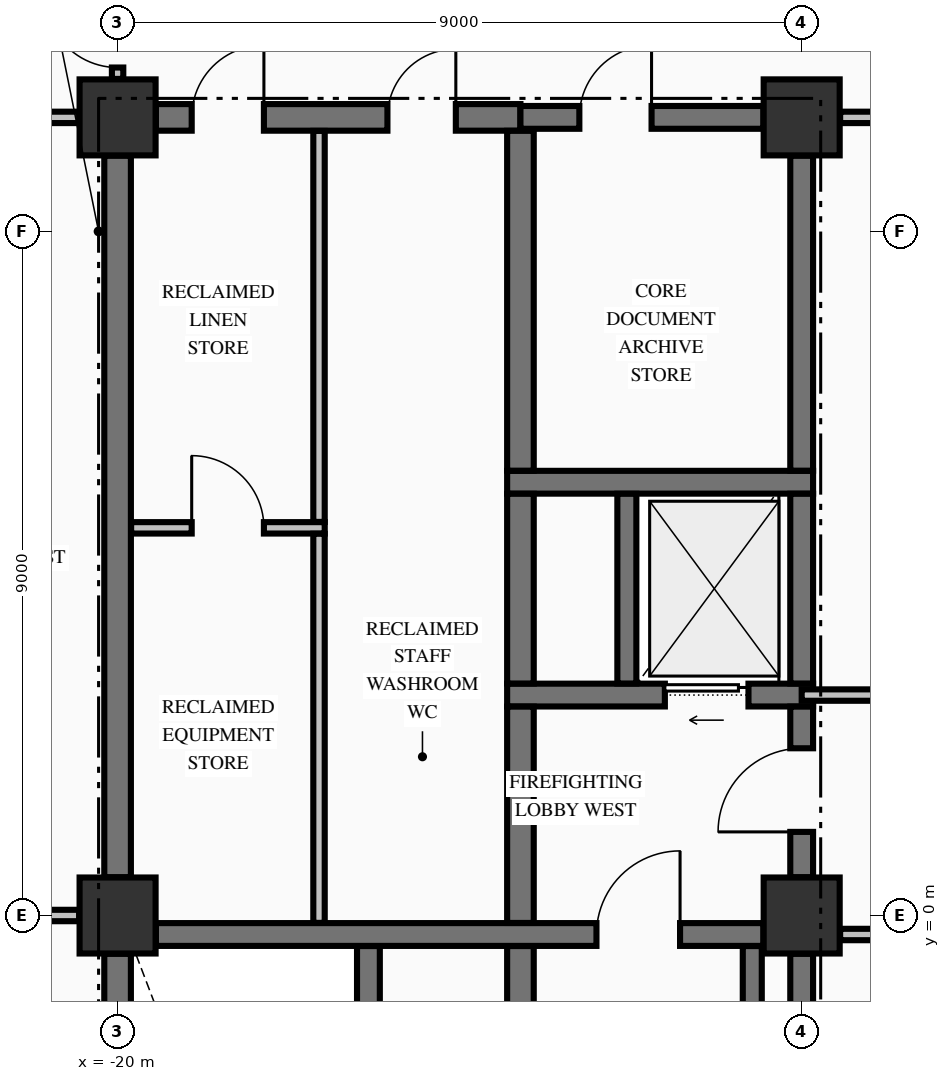
"""IFC4 building model, lengths in metres.
Left out: names, types, materials, properties, quantities, classifications, styles, units other than length and angle.
Written with IfcOpenShell. Run it as: python <this file> out.ifc"""

import sys

from ifc_helpers import new_model, si_unit, direction, frame, frame_2d, origin, origin_2d, place, context, subcontext, project, spatial, rectangle, extrude, element, fill, save


model = new_model("IFC4")
c1 = context("Model", 3, precision=1e-05, world=origin(), true_north=direction((0.0, 1.0)))
c2 = subcontext(c1, "Body", "Model", "MODEL_VIEW")
j1 = project(units=[si_unit("LENGTHUNIT", "METRE"), si_unit("PLANEANGLEUNIT", "RADIAN")], contexts=[c1])
p1 = place(None, origin())
s1 = spatial("IfcSite", under=j1, at=p1, CompositionType="ELEMENT")
p2 = place(p1, origin())
s2 = spatial("IfcBuilding", under=s1, at=p2, CompositionType="ELEMENT")
p3 = place(p2, frame((0.0, 0.0, 98.5)))
s3 = spatial("IfcBuildingStorey", under=s2, at=p3, CompositionType="ELEMENT", Elevation=98.5)
for number, where, z_axis, x_axis in (
    (1, (-20.0, 10.5, -0.275), (0.0, 0.0, 1.0), (1.0, 0.0, 0.0)),
    (2, (-11.0, 0.0, -0.275), (0.0, 0.0, 1.0), (1.0, 0.0, 0.0)),
    (3, (-11.0, 10.5, -0.275), (0.0, 0.0, 1.0), (1.0, 0.0, 0.0)),
    (4, (-20.0, 0.0, -0.275), (0.0, 0.0, 1.0), (1.0, 0.0, 0.0)),
):
    element("IfcColumn", number, at=place(p3, frame(where, z_axis=z_axis, x_axis=x_axis)), inside=s3, PredefinedType="COLUMN", context=c2, shape_type="SweptSolid", body=[
        extrude(rectangle(XDim=1.0, YDim=1.0, at=origin_2d()), origin(), (0.0, 0.0, 1.0), 3.595),
    ])
p4 = place(p3, frame((-19.496, -0.25, 0.0), z_axis=(0.0, 0.0, 1.0), x_axis=(1.0, 0.0, 0.0)))
e5 = element("IfcWall", 5, at=p4, inside=s3, PredefinedType="SHEAR", context=c2, shape_type="SweptSolid", body=[
    extrude(rectangle(XDim=7.992, YDim=0.3, at=frame_2d((3.996, 0.0))), origin(), (0.0, 0.0, 1.0), 3.32),
])
p5 = place(p4, frame((5.796, 0.0, 0.0)))
e6 = element("IfcOpeningElement", 6, at=p5, cuts=e5, PredefinedType="OPENING", context=c2, shape_type="SweptSolid", body=[
    extrude(rectangle(XDim=1.1, YDim=2.15, at=frame_2d((0.55, 1.075))), frame((0.0, 0.16, 0.0), z_axis=(0.0, -1.0, 0.0), x_axis=(1.0, 0.0, 0.0)), (0.0, 0.0, 1.0), 0.32),
])
p6 = place(p3, frame((-14.875, 2.9, 0.0), z_axis=(0.0, 0.0, 1.0), x_axis=(1.0, 0.0, 0.0)))
e7 = element("IfcWall", 7, at=p6, inside=s3, PredefinedType="SHEAR", context=c2, shape_type="SweptSolid", body=[
    extrude(rectangle(XDim=4.025, YDim=0.3, at=frame_2d((2.012, 0.0))), origin(), (0.0, 0.0, 1.0), 3.32),
])
p7 = place(p6, frame((2.075, 0.0, 0.0)))
e8 = element("IfcOpeningElement", 8, at=p7, cuts=e7, PredefinedType="OPENING", context=c2, shape_type="SweptSolid", body=[
    extrude(rectangle(XDim=1.1, YDim=2.2, at=frame_2d((0.55, 1.1))), frame((0.0, 0.16, 0.0), z_axis=(0.0, -1.0, 0.0), x_axis=(1.0, 0.0, 0.0)), (0.0, 0.0, 1.0), 0.32),
])
p8 = place(p3, frame((-14.875, 5.7, 0.0), z_axis=(0.0, 0.0, 1.0), x_axis=(1.0, 0.0, 0.0)))
e9 = element("IfcWall", 9, at=p8, inside=s3, PredefinedType="SHEAR", context=c2, shape_type="SweptSolid", body=[
    extrude(rectangle(XDim=4.025, YDim=0.3, at=frame_2d((2.012, 0.0))), origin(), (0.0, 0.0, 1.0), 3.32),
])
p9 = place(p3, frame((-19.496, 10.5, 0.0), z_axis=(0.0, 0.0, 1.0), x_axis=(1.0, 0.0, 0.0)))
e10 = element("IfcWall", 10, at=p9, inside=s3, PredefinedType="SHEAR", context=c2, shape_type="SweptSolid", body=[
    extrude(rectangle(XDim=4.796, YDim=0.35, at=frame_2d((2.398, 0.0))), origin(), (0.0, 0.0, 1.0), 3.32),
])
p10 = place(p9, frame((0.471, 0.0, 0.0)))
e11 = element("IfcOpeningElement", 11, at=p10, cuts=e10, PredefinedType="OPENING", context=c2, shape_type="SweptSolid", body=[
    extrude(rectangle(XDim=0.95, YDim=2.15, at=frame_2d((0.475, 1.075))), frame((0.0, 0.185, 0.0), z_axis=(0.0, -1.0, 0.0), x_axis=(1.0, 0.0, 0.0)), (0.0, 0.0, 1.0), 0.37),
])
p11 = place(p9, frame((3.046, 0.0, 0.0)))
e12 = element("IfcOpeningElement", 12, at=p11, cuts=e10, PredefinedType="OPENING", context=c2, shape_type="SweptSolid", body=[
    extrude(rectangle(XDim=0.9, YDim=2.15, at=frame_2d((0.45, 1.075))), frame((0.0, 0.185, 0.0), z_axis=(0.0, -1.0, 0.0), x_axis=(1.0, 0.0, 0.0)), (0.0, 0.0, 1.0), 0.37),
])
p12 = place(p3, frame((-14.7, 10.5, 0.0), z_axis=(0.0, 0.0, 1.0), x_axis=(1.0, 0.0, 0.0)))
e13 = element("IfcWall", 13, at=p12, inside=s3, PredefinedType="SHEAR", context=c2, shape_type="SweptSolid", body=[
    extrude(rectangle(XDim=3.196, YDim=0.3, at=frame_2d((1.598, 0.0))), origin(), (0.0, 0.0, 1.0), 3.32),
])
p13 = place(p12, frame((0.775, 0.0, 0.0)))
e14 = element("IfcOpeningElement", 14, at=p13, cuts=e13, PredefinedType="OPENING", context=c2, shape_type="SweptSolid", body=[
    extrude(rectangle(XDim=0.95, YDim=2.15, at=frame_2d((0.475, 1.075))), frame((0.0, 0.16, 0.0), z_axis=(0.0, -1.0, 0.0), x_axis=(1.0, 0.0, 0.0)), (0.0, 0.0, 1.0), 0.32),
])
p14 = place(p3, frame((-10.494, -0.25, 0.0), z_axis=(0.0, 0.0, 1.0), x_axis=(1.0, 0.0, 0.0)))
e15 = element("IfcWall", 15, at=p14, inside=s3, PredefinedType="PARTITIONING", context=c2, shape_type="SweptSolid", body=[
    extrude(rectangle(XDim=20.988, YDim=0.15, at=frame_2d((10.494, 0.0))), origin(), (0.0, 0.0, 1.0), 3.32),
])
p15 = place(p14, frame((8.194, 0.0, 0.0)))
e16 = element("IfcOpeningElement", 16, at=p15, cuts=e15, PredefinedType="OPENING", context=c2, shape_type="SweptSolid", body=[
    extrude(rectangle(XDim=1.1, YDim=2.15, at=frame_2d((0.55, 1.075))), frame((0.0, 0.085, 0.0), z_axis=(0.0, -1.0, 0.0), x_axis=(1.0, 0.0, 0.0)), (0.0, 0.0, 1.0), 0.17),
])
p16 = place(p14, frame((3.049, 0.0, 0.0)))
e17 = element("IfcOpeningElement", 17, at=p16, cuts=e15, PredefinedType="OPENING", context=c2, shape_type="SweptSolid", body=[
    extrude(rectangle(XDim=1.05, YDim=2.15, at=frame_2d((0.525, 1.075))), frame((0.0, 0.085, 0.0), z_axis=(0.0, -1.0, 0.0), x_axis=(1.0, 0.0, 0.0)), (0.0, 0.0, 1.0), 0.17),
])
p17 = place(p14, frame((15.189, 0.0, 0.0)))
e18 = element("IfcOpeningElement", 18, at=p17, cuts=e15, PredefinedType="OPENING", context=c2, shape_type="SweptSolid", body=[
    extrude(rectangle(XDim=0.95, YDim=2.15, at=frame_2d((0.475, 1.075))), frame((0.0, 0.085, 0.0), z_axis=(0.0, -1.0, 0.0), x_axis=(1.0, 0.0, 0.0)), (0.0, 0.0, 1.0), 0.17),
])
p18 = place(p3, frame((-22.394, 0.0, 0.0), z_axis=(0.0, 0.0, 1.0), x_axis=(1.0, 0.0, 0.0)))
e19 = element("IfcWall", 19, at=p18, inside=s3, PredefinedType="PARTITIONING", context=c2, shape_type="SweptSolid", body=[
    extrude(rectangle(XDim=1.888, YDim=0.15, at=frame_2d((0.944, 0.0))), origin(), (0.0, 0.0, 1.0), 2.81),
])
p19 = place(p3, frame((-11.0, 2.9, 0.0), z_axis=(0.0, 0.0, 1.0), x_axis=(1.0, 0.0, 0.0)))
e20 = element("IfcWall", 20, at=p19, inside=s3, PredefinedType="PARTITIONING", context=c2, shape_type="SweptSolid", body=[
    extrude(rectangle(XDim=22.0, YDim=0.15, at=frame_2d((11.0, 0.0))), origin(), (0.0, 0.0, 1.0), 3.32),
])
p20 = place(p19, frame((8.7, 0.0, 0.0)))
e21 = element("IfcOpeningElement", 21, at=p20, cuts=e20, PredefinedType="OPENING", context=c2, shape_type="SweptSolid", body=[
    extrude(rectangle(XDim=1.1, YDim=2.15, at=frame_2d((0.55, 1.075))), frame((0.0, 0.085, 0.0), z_axis=(0.0, -1.0, 0.0), x_axis=(1.0, 0.0, 0.0)), (0.0, 0.0, 1.0), 0.17),
])
p21 = place(p19, frame((3.555, 0.0, 0.0)))
e22 = element("IfcOpeningElement", 22, at=p21, cuts=e20, PredefinedType="OPENING", context=c2, shape_type="SweptSolid", body=[
    extrude(rectangle(XDim=1.05, YDim=2.15, at=frame_2d((0.525, 1.075))), frame((0.0, 0.085, 0.0), z_axis=(0.0, -1.0, 0.0), x_axis=(1.0, 0.0, 0.0)), (0.0, 0.0, 1.0), 0.17),
])
p22 = place(p19, frame((15.62, 0.0, 0.0)))
e23 = element("IfcOpeningElement", 23, at=p22, cuts=e20, PredefinedType="OPENING", context=c2, shape_type="SweptSolid", body=[
    extrude(rectangle(XDim=1.1, YDim=2.15, at=frame_2d((0.55, 1.075))), frame((0.0, 0.085, 0.0), z_axis=(0.0, -1.0, 0.0), x_axis=(1.0, 0.0, 0.0)), (0.0, 0.0, 1.0), 0.17),
])
p23 = place(p3, frame((-19.822, 5.1, 0.0), z_axis=(0.0, 0.0, 1.0), x_axis=(1.0, 0.0, 0.0)))
e24 = element("IfcWall", 24, at=p23, inside=s3, PredefinedType="PARTITIONING", context=c2, shape_type="SweptSolid", body=[
    extrude(rectangle(XDim=2.547, YDim=0.15, at=frame_2d((1.273, 0.0))), origin(), (0.0, 0.0, 1.0), 3.32),
])
p24 = place(p23, frame((0.797, 0.0, 0.0)))
e25 = element("IfcOpeningElement", 25, at=p24, cuts=e24, PredefinedType="OPENING", context=c2, shape_type="SweptSolid", body=[
    extrude(rectangle(XDim=0.95, YDim=2.15, at=frame_2d((0.475, 1.075))), frame((0.0, 0.085, 0.0), z_axis=(0.0, -1.0, 0.0), x_axis=(1.0, 0.0, 0.0)), (0.0, 0.0, 1.0), 0.17),
])
p25 = place(p3, frame((-22.835, 10.5, 0.0), z_axis=(0.0, 0.0, 1.0), x_axis=(1.0, 0.0, 0.0)))
e26 = element("IfcWall", 26, at=p25, inside=s3, PredefinedType="PARTITIONING", context=c2, shape_type="SweptSolid", body=[
    extrude(rectangle(XDim=2.329, YDim=0.15, at=frame_2d((1.165, 0.0))), origin(), (0.0, 0.0, 1.0), 3.32),
])
p26 = place(p25, frame((0.86, 0.0, 0.0)))
e27 = element("IfcOpeningElement", 27, at=p26, cuts=e26, PredefinedType="OPENING", context=c2, shape_type="SweptSolid", body=[
    extrude(rectangle(XDim=0.95, YDim=2.15, at=frame_2d((0.475, 1.075))), frame((0.0, 0.085, 0.0), z_axis=(0.0, -1.0, 0.0), x_axis=(1.0, 0.0, 0.0)), (0.0, 0.0, 1.0), 0.17),
])
p27 = place(p3, frame((-10.494, 10.5, 0.0), z_axis=(0.0, 0.0, 1.0), x_axis=(1.0, 0.0, 0.0)))
e28 = element("IfcWall", 28, at=p27, inside=s3, PredefinedType="PARTITIONING", context=c2, shape_type="SweptSolid", body=[
    extrude(rectangle(XDim=20.988, YDim=0.15, at=frame_2d((10.494, 0.0))), origin(), (0.0, 0.0, 1.0), 3.32),
])
p28 = place(p27, frame((8.194, 0.0, 0.0)))
e29 = element("IfcOpeningElement", 29, at=p28, cuts=e28, PredefinedType="OPENING", context=c2, shape_type="SweptSolid", body=[
    extrude(rectangle(XDim=1.1, YDim=2.15, at=frame_2d((0.55, 1.075))), frame((0.0, 0.085, 0.0), z_axis=(0.0, -1.0, 0.0), x_axis=(1.0, 0.0, 0.0)), (0.0, 0.0, 1.0), 0.17),
])
p29 = place(p3, frame((-20.0, -9.446, 0.0), z_axis=(0.0, 0.0, 1.0), x_axis=(0.0, 1.0, 0.0)))
e30 = element("IfcWall", 30, at=p29, inside=s3, PredefinedType="SHEAR", context=c2, shape_type="SweptSolid", body=[
    extrude(rectangle(XDim=8.942, YDim=0.35, at=frame_2d((4.471, 0.0))), origin(), (0.0, 0.0, 1.0), 3.32),
])
p30 = place(p3, frame((-20.0, 0.504, 0.0), z_axis=(0.0, 0.0, 1.0), x_axis=(0.0, 1.0, 0.0)))
e31 = element("IfcWall", 31, at=p30, inside=s3, PredefinedType="SHEAR", context=c2, shape_type="SweptSolid", body=[
    extrude(rectangle(XDim=9.492, YDim=0.35, at=frame_2d((4.746, 0.0))), origin(), (0.0, 0.0, 1.0), 3.32),
])
p31 = place(p3, frame((-16.7, -9.773, 0.0), z_axis=(0.0, 0.0, 1.0), x_axis=(0.0, 1.0, 0.0)))
e32 = element("IfcWall", 32, at=p31, inside=s3, PredefinedType="SHEAR", context=c2, shape_type="SweptSolid", body=[
    extrude(rectangle(XDim=9.371, YDim=0.3, at=frame_2d((4.686, 0.0))), origin(), (0.0, 0.0, 1.0), 3.32),
])
p32 = place(p3, frame((-14.7, -9.773, 0.0), z_axis=(0.0, 0.0, 1.0), x_axis=(0.0, 1.0, 0.0)))
e33 = element("IfcWall", 33, at=p32, inside=s3, PredefinedType="SHEAR", context=c2, shape_type="SweptSolid", body=[
    extrude(rectangle(XDim=9.371, YDim=0.35, at=frame_2d((4.686, 0.0))), origin(), (0.0, 0.0, 1.0), 3.32),
])
p33 = place(p3, frame((-14.7, -0.098, 0.0), z_axis=(0.0, 0.0, 1.0), x_axis=(0.0, 1.0, 0.0)))
e34 = element("IfcWall", 34, at=p33, inside=s3, PredefinedType="SHEAR", context=c2, shape_type="SweptSolid", body=[
    extrude(rectangle(XDim=2.846, YDim=0.35, at=frame_2d((1.423, 0.0))), origin(), (0.0, 0.0, 1.0), 3.32),
])
p34 = place(p3, frame((-14.7, 3.052, 0.0), z_axis=(0.0, 0.0, 1.0), x_axis=(0.0, 1.0, 0.0)))
e35 = element("IfcWall", 35, at=p34, inside=s3, PredefinedType="SHEAR", context=c2, shape_type="SweptSolid", body=[
    extrude(rectangle(XDim=2.496, YDim=0.35, at=frame_2d((1.248, 0.0))), origin(), (0.0, 0.0, 1.0), 3.32),
])
p35 = place(p3, frame((-14.7, 5.852, 0.0), z_axis=(0.0, 0.0, 1.0), x_axis=(0.0, 1.0, 0.0)))
e36 = element("IfcWall", 36, at=p35, inside=s3, PredefinedType="SHEAR", context=c2, shape_type="SweptSolid", body=[
    extrude(rectangle(XDim=4.471, YDim=0.35, at=frame_2d((2.235, 0.0))), origin(), (0.0, 0.0, 1.0), 3.32),
])
p36 = place(p3, frame((-13.3, 3.052, 0.0), z_axis=(0.0, 0.0, 1.0), x_axis=(0.0, 1.0, 0.0)))
e37 = element("IfcWall", 37, at=p36, inside=s3, PredefinedType="SOLIDWALL", context=c2, shape_type="SweptSolid", body=[
    extrude(rectangle(XDim=2.496, YDim=0.25, at=frame_2d((1.248, 0.0))), origin(), (0.0, 0.0, 1.0), 3.32),
])
p37 = place(p3, frame((-11.65, -9.798, 0.0), z_axis=(0.0, 0.0, 1.0), x_axis=(0.0, 1.0, 0.0)))
e38 = element("IfcWall", 38, at=p37, inside=s3, PredefinedType="SOLIDWALL", context=c2, shape_type="SweptSolid", body=[
    extrude(rectangle(XDim=9.396, YDim=0.25, at=frame_2d((4.698, 0.0))), origin(), (0.0, 0.0, 1.0), 3.32),
])
p38 = place(p3, frame((-11.0, -9.446, 0.0), z_axis=(0.0, 0.0, 1.0), x_axis=(0.0, 1.0, 0.0)))
e39 = element("IfcWall", 39, at=p38, inside=s3, PredefinedType="SHEAR", context=c2, shape_type="SweptSolid", body=[
    extrude(rectangle(XDim=8.942, YDim=0.3, at=frame_2d((4.471, 0.0))), origin(), (0.0, 0.0, 1.0), 3.32),
])
p39 = place(p3, frame((-11.0, 0.504, 0.0), z_axis=(0.0, 0.0, 1.0), x_axis=(0.0, 1.0, 0.0)))
e40 = element("IfcWall", 40, at=p39, inside=s3, PredefinedType="SHEAR", context=c2, shape_type="SweptSolid", body=[
    extrude(rectangle(XDim=2.244, YDim=0.3, at=frame_2d((1.122, 0.0))), origin(), (0.0, 0.0, 1.0), 3.32),
])
p40 = place(p39, frame((0.596, 0.0, 0.0)))
e41 = element("IfcOpeningElement", 41, at=p40, cuts=e40, PredefinedType="OPENING", context=c2, shape_type="SweptSolid", body=[
    extrude(rectangle(XDim=1.1, YDim=2.15, at=frame_2d((0.55, 1.075))), frame((0.0, 0.16, 0.0), z_axis=(0.0, -1.0, 0.0), x_axis=(1.0, 0.0, 0.0)), (0.0, 0.0, 1.0), 0.32),
])
p41 = place(p3, frame((-11.0, 3.052, 0.0), z_axis=(0.0, 0.0, 1.0), x_axis=(0.0, 1.0, 0.0)))
e42 = element("IfcWall", 42, at=p41, inside=s3, PredefinedType="SHEAR", context=c2, shape_type="SweptSolid", body=[
    extrude(rectangle(XDim=2.496, YDim=0.3, at=frame_2d((1.248, 0.0))), origin(), (0.0, 0.0, 1.0), 3.32),
])
p42 = place(p3, frame((-11.0, 5.852, 0.0), z_axis=(0.0, 0.0, 1.0), x_axis=(0.0, 1.0, 0.0)))
e43 = element("IfcWall", 43, at=p42, inside=s3, PredefinedType="SHEAR", context=c2, shape_type="SweptSolid", body=[
    extrude(rectangle(XDim=4.144, YDim=0.3, at=frame_2d((2.072, 0.0))), origin(), (0.0, 0.0, 1.0), 3.32),
])
p43 = place(p3, frame((-20.0, 11.006, 0.0), z_axis=(0.0, 0.0, 1.0), x_axis=(0.0, 1.0, 0.0)))
e44 = element("IfcWall", 44, at=p43, inside=s3, PredefinedType="PARTITIONING", context=c2, shape_type="SweptSolid", body=[
    extrude(rectangle(XDim=1.666, YDim=0.15, at=frame_2d((0.833, 0.0))), origin(), (0.0, 0.0, 1.0), 2.81),
])
p44 = place(p43, frame((0.15, 0.0, 0.0)))
e45 = element("IfcOpeningElement", 45, at=p44, cuts=e44, PredefinedType="OPENING", context=c2, shape_type="SweptSolid", body=[
    extrude(rectangle(XDim=0.95, YDim=2.15, at=frame_2d((0.475, 1.075))), frame((0.0, 0.085, 0.0), z_axis=(0.0, -1.0, 0.0), x_axis=(1.0, 0.0, 0.0)), (0.0, 0.0, 1.0), 0.17),
])
p45 = place(p3, frame((-17.35, -0.097, 0.0), z_axis=(0.0, 0.0, 1.0), x_axis=(0.0, 1.0, 0.0)))
e46 = element("IfcWall", 46, at=p45, inside=s3, PredefinedType="PARTITIONING", context=c2, shape_type="SweptSolid", body=[
    extrude(rectangle(XDim=5.119, YDim=0.15, at=frame_2d((2.56, 0.0))), origin(), (0.0, 0.0, 1.0), 3.32),
])
p46 = place(p3, frame((-17.35, 5.178, 0.0), z_axis=(0.0, 0.0, 1.0), x_axis=(0.0, 1.0, 0.0)))
e47 = element("IfcWall", 47, at=p46, inside=s3, PredefinedType="PARTITIONING", context=c2, shape_type="SweptSolid", body=[
    extrude(rectangle(XDim=5.144, YDim=0.15, at=frame_2d((2.572, 0.0))), origin(), (0.0, 0.0, 1.0), 3.32),
])
p47 = place(p5, origin())
e48 = element("IfcDoor", 48, at=p47, inside=s3, OperationType="SINGLE_SWING_RIGHT", PredefinedType="DOOR", context=c2, shape_type="SweptSolid", body=[
    extrude(rectangle(XDim=1.1, YDim=2.15, at=frame_2d((0.55, 1.075))), frame((0.0, 0.025, 0.0), z_axis=(0.0, -1.0, 0.0), x_axis=(1.0, 0.0, 0.0)), (0.0, 0.0, 1.0), 0.05),
])
fill(e6, e48)
p48 = place(p40, origin())
e49 = element("IfcDoor", 49, at=p48, inside=s3, OperationType="SINGLE_SWING_LEFT", PredefinedType="DOOR", context=c2, shape_type="SweptSolid", body=[
    extrude(rectangle(XDim=1.1, YDim=2.15, at=frame_2d((0.55, 1.075))), frame((0.0, 0.025, 0.0), z_axis=(0.0, -1.0, 0.0), x_axis=(1.0, 0.0, 0.0)), (0.0, 0.0, 1.0), 0.05),
])
fill(e41, e49)
p49 = place(p7, origin())
e50 = element("IfcDoor", 50, at=p49, inside=s3, OperationType="SLIDING_TO_LEFT", PredefinedType="DOOR", context=c2, shape_type="SweptSolid", body=[
    extrude(rectangle(XDim=1.1, YDim=2.2, at=frame_2d((0.55, 1.1))), frame((0.0, 0.025, 0.0), z_axis=(0.0, -1.0, 0.0), x_axis=(1.0, 0.0, 0.0)), (0.0, 0.0, 1.0), 0.05),
])
fill(e8, e50)
p50 = place(p13, origin())
e51 = element("IfcDoor", 51, at=p50, inside=s3, OperationType="SINGLE_SWING_RIGHT", PredefinedType="DOOR", context=c2, shape_type="SweptSolid", body=[
    extrude(rectangle(XDim=0.95, YDim=2.15, at=frame_2d((0.475, 1.075))), frame((0.0, 0.025, 0.0), z_axis=(0.0, -1.0, 0.0), x_axis=(1.0, 0.0, 0.0)), (0.0, 0.0, 1.0), 0.05),
])
fill(e14, e51)
p51 = place(p10, origin())
e52 = element("IfcDoor", 52, at=p51, inside=s3, OperationType="SINGLE_SWING_RIGHT", PredefinedType="DOOR", context=c2, shape_type="SweptSolid", body=[
    extrude(rectangle(XDim=0.95, YDim=2.15, at=frame_2d((0.475, 1.075))), frame((0.0, 0.025, 0.0), z_axis=(0.0, -1.0, 0.0), x_axis=(1.0, 0.0, 0.0)), (0.0, 0.0, 1.0), 0.05),
])
fill(e11, e52)
p52 = place(p24, origin())
e53 = element("IfcDoor", 53, at=p52, inside=s3, OperationType="SINGLE_SWING_LEFT", PredefinedType="DOOR", context=c2, shape_type="SweptSolid", body=[
    extrude(rectangle(XDim=0.95, YDim=2.15, at=frame_2d((0.475, 1.075))), frame((0.0, 0.025, 0.0), z_axis=(0.0, -1.0, 0.0), x_axis=(1.0, 0.0, 0.0)), (0.0, 0.0, 1.0), 0.05),
])
fill(e25, e53)
p53 = place(p11, origin())
e54 = element("IfcDoor", 54, at=p53, inside=s3, OperationType="SINGLE_SWING_RIGHT", PredefinedType="DOOR", context=c2, shape_type="SweptSolid", body=[
    extrude(rectangle(XDim=0.9, YDim=2.15, at=frame_2d((0.45, 1.075))), frame((0.0, 0.025, 0.0), z_axis=(0.0, -1.0, 0.0), x_axis=(1.0, 0.0, 0.0)), (0.0, 0.0, 1.0), 0.05),
])
fill(e12, e54)
p54 = place(p44, origin())
e55 = element("IfcDoor", 55, at=p54, inside=s3, OperationType="SINGLE_SWING_RIGHT", PredefinedType="DOOR", context=c2, shape_type="SweptSolid", body=[
    extrude(rectangle(XDim=0.95, YDim=2.15, at=frame_2d((0.475, 1.075))), frame((0.0, 0.025, 0.0), z_axis=(0.0, -1.0, 0.0), x_axis=(1.0, 0.0, 0.0)), (0.0, 0.0, 1.0), 0.05),
])
fill(e45, e55)
save(model, sys.argv[1])
